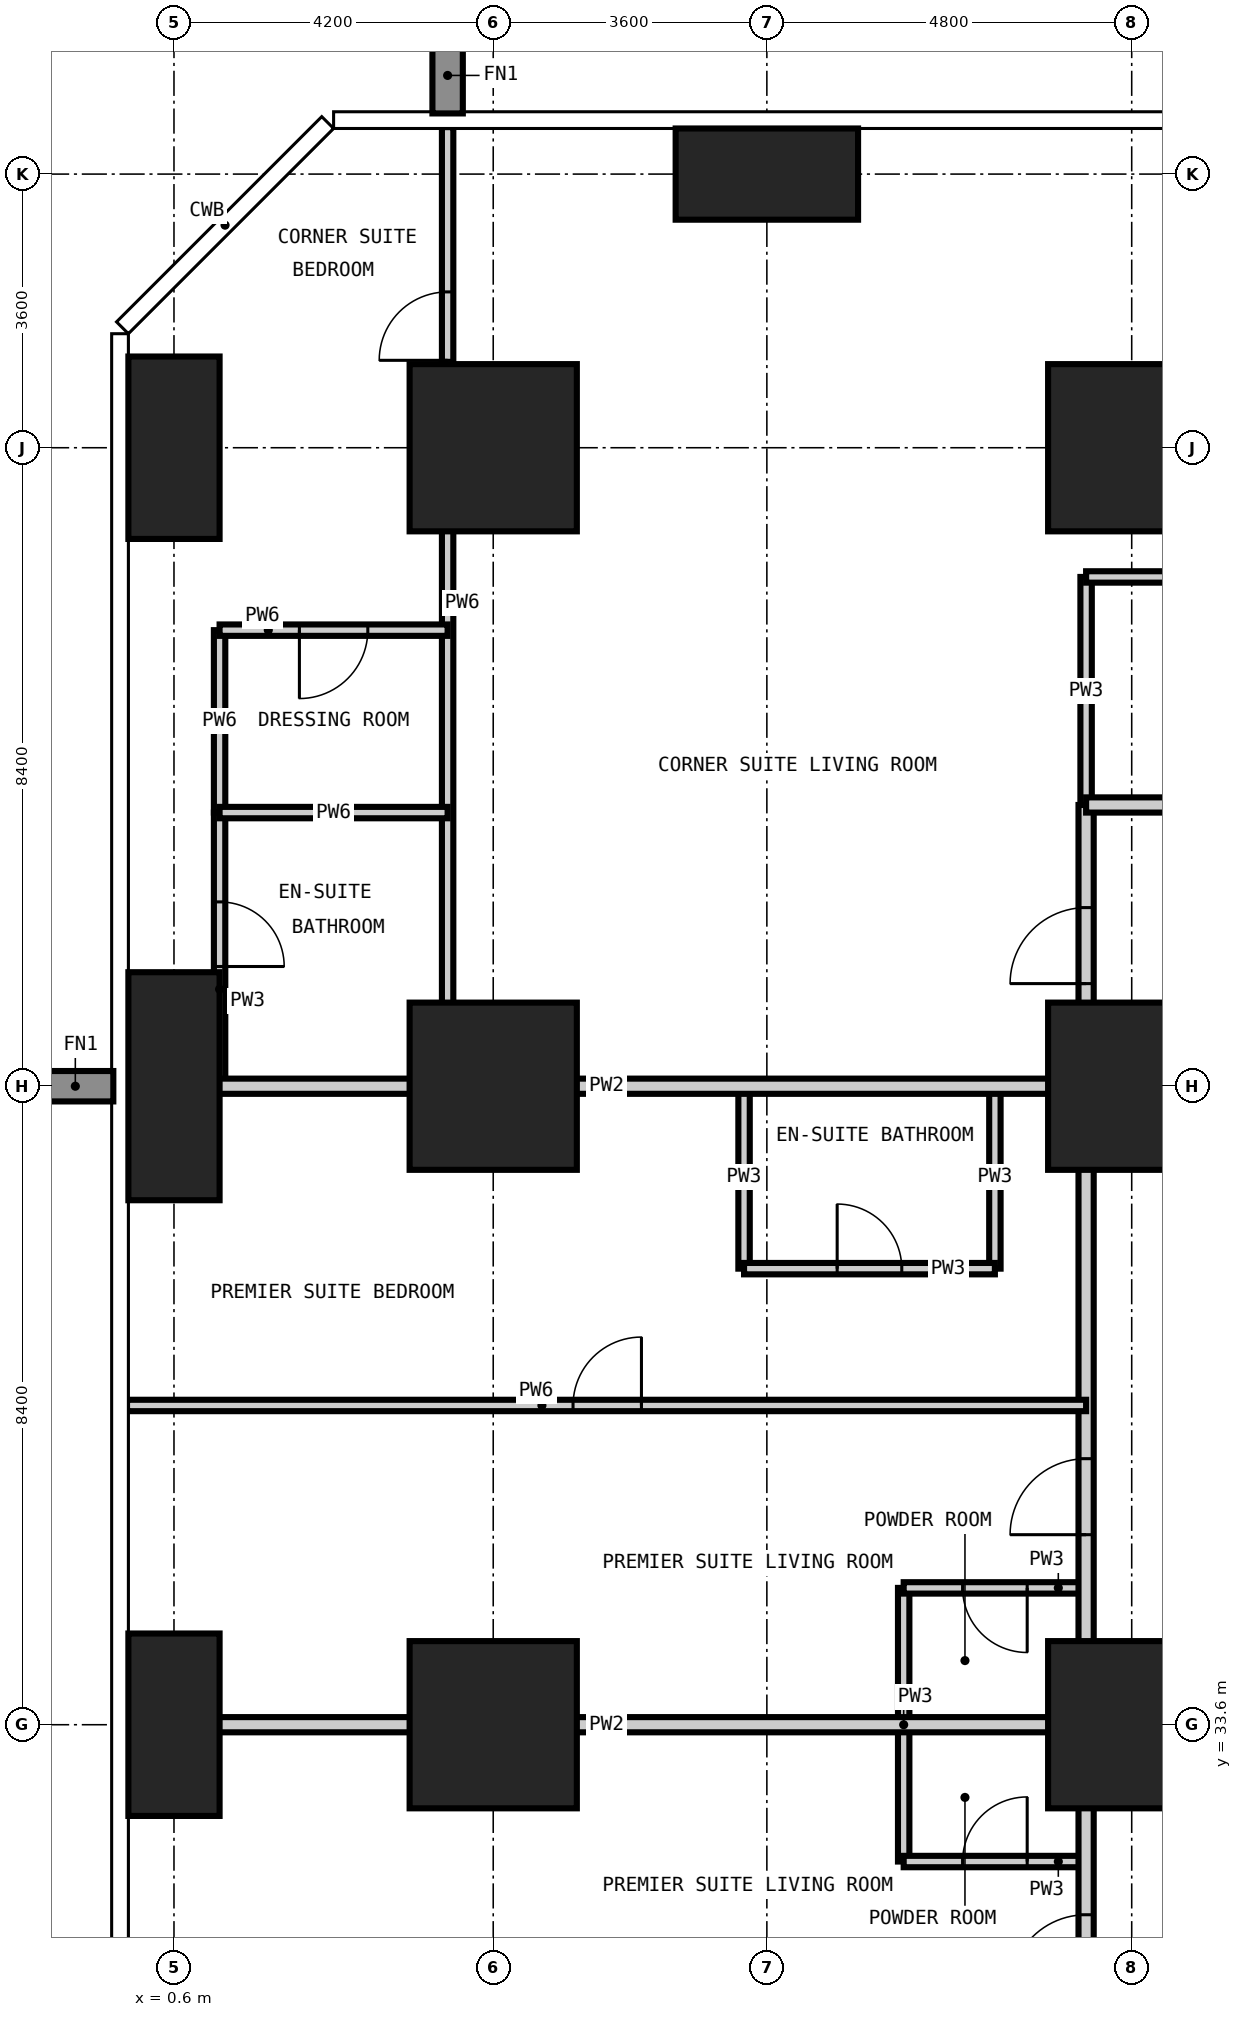
"""IFC4 building model, lengths in metres.
Left out: names, types, materials, properties, quantities, classifications, styles, units other than length and angle.
Written with IfcOpenShell. Run it as: python <this file> out.ifc"""

import sys

from ifc_helpers import new_model, si_unit, direction, frame, frame_2d, origin, origin_2d, place, context, subcontext, project, spatial, rectangle, extrude, element, fill, save


model = new_model("IFC4")
c1 = context("Model", 3, precision=1e-05, world=origin(), true_north=direction((0.0, 1.0)))
c2 = subcontext(c1, "Body", "Model", "MODEL_VIEW")
j1 = project(units=[si_unit("LENGTHUNIT", "METRE"), si_unit("PLANEANGLEUNIT", "RADIAN")], contexts=[c1])
p1 = place(None, origin())
s1 = spatial("IfcSite", under=j1, at=p1, CompositionType="ELEMENT")
p2 = place(p1, origin())
s2 = spatial("IfcBuilding", under=s1, at=p2, CompositionType="ELEMENT")
p3 = place(p2, frame((0.0, 0.0, 97.2)))
s3 = spatial("IfcBuildingStorey", under=s2, at=p3, CompositionType="ELEMENT", Elevation=97.2)
p4 = place(p3, frame((0.6, 33.6, -0.35), z_axis=(0.0, 0.0, 1.0), x_axis=(1.0, 0.0, 0.0)))
e1 = element("IfcColumn", 1, at=p4, inside=s3, PredefinedType="COLUMN", context=c2, shape_type="SweptSolid", body=[
    extrude(rectangle(XDim=1.2, YDim=2.4, at=origin_2d()), origin(), (0.0, 0.0, 1.0), 3.6),
])
p5 = place(p3, frame((0.6, 42.0, -0.35), z_axis=(0.0, 0.0, 1.0), x_axis=(1.0, 0.0, 0.0)))
e2 = element("IfcColumn", 2, at=p5, inside=s3, PredefinedType="COLUMN", context=c2, shape_type="SweptSolid", body=[
    extrude(rectangle(XDim=1.2, YDim=3.0, at=origin_2d()), origin(), (0.0, 0.0, 1.0), 3.6),
])
p6 = place(p3, frame((0.6, 50.4, -0.35), z_axis=(0.0, 0.0, 1.0), x_axis=(1.0, 0.0, 0.0)))
e3 = element("IfcColumn", 3, at=p6, inside=s3, PredefinedType="COLUMN", context=c2, shape_type="SweptSolid", body=[
    extrude(rectangle(XDim=1.2, YDim=2.4, at=origin_2d()), origin(), (0.0, 0.0, 1.0), 3.6),
])
for number, where, z_axis, x_axis in (
    (4, (4.8, 33.6, -0.35), (0.0, 0.0, 1.0), (1.0, 0.0, 0.0)),
    (5, (4.8, 42.0, -0.35), (0.0, 0.0, 1.0), (1.0, 0.0, 0.0)),
    (6, (4.8, 50.4, -0.35), (0.0, 0.0, 1.0), (1.0, 0.0, 0.0)),
):
    element("IfcColumn", number, at=place(p3, frame(where, z_axis=z_axis, x_axis=x_axis)), inside=s3, PredefinedType="COLUMN", context=c2, shape_type="SweptSolid", body=[
        extrude(rectangle(XDim=2.2, YDim=2.2, at=origin_2d()), origin(), (0.0, 0.0, 1.0), 3.6),
    ])
p7 = place(p3, frame((8.4, 54.0, -0.35), z_axis=(0.0, 0.0, 1.0), x_axis=(1.0, 0.0, 0.0)))
e7 = element("IfcColumn", 7, at=p7, inside=s3, PredefinedType="COLUMN", context=c2, shape_type="SweptSolid", body=[
    extrude(rectangle(XDim=2.4, YDim=1.2, at=origin_2d()), origin(), (0.0, 0.0, 1.0), 3.6),
])
for number, where, z_axis, x_axis in (
    (8, (13.2, 33.6, -0.35), (0.0, 0.0, 1.0), (1.0, 0.0, 0.0)),
    (9, (13.2, 42.0, -0.35), (0.0, 0.0, 1.0), (1.0, 0.0, 0.0)),
    (10, (13.2, 50.4, -0.35), (0.0, 0.0, 1.0), (1.0, 0.0, 0.0)),
):
    element("IfcColumn", number, at=place(p3, frame(where, z_axis=z_axis, x_axis=x_axis)), inside=s3, PredefinedType="COLUMN", context=c2, shape_type="SweptSolid", body=[
        extrude(rectangle(XDim=2.2, YDim=2.2, at=origin_2d()), origin(), (0.0, 0.0, 1.0), 3.6),
    ])
p8 = place(p3, frame((1.2, 42.0, 0.0), z_axis=(0.0, 0.0, 1.0), x_axis=(0.0, 1.0, 0.0)))
e11 = element("IfcWall", 11, at=p8, inside=s3, PredefinedType="PARTITIONING", context=c2, shape_type="SweptSolid", body=[
    extrude(rectangle(XDim=3.6, YDim=0.15, at=frame_2d((1.8, 0.0))), origin(), (0.0, 0.0, 1.0), 3.25),
])
p9 = place(p8, frame((1.575, 0.0, 0.0)))
e12 = element("IfcOpeningElement", 12, at=p9, cuts=e11, PredefinedType="OPENING", context=c2, shape_type="SweptSolid", body=[
    extrude(rectangle(XDim=0.85, YDim=2.1, at=frame_2d((0.425, 1.05))), frame((0.0, 0.085, 0.0), z_axis=(0.0, -1.0, 0.0), x_axis=(1.0, 0.0, 0.0)), (0.0, 0.0, 1.0), 0.17),
])
p10 = place(p3, frame((8.1, 39.6, 0.0), z_axis=(0.0, 0.0, 1.0), x_axis=(0.0, 1.0, 0.0)))
e13 = element("IfcWall", 13, at=p10, inside=s3, PredefinedType="PARTITIONING", context=c2, shape_type="SweptSolid", body=[
    extrude(rectangle(XDim=2.4, YDim=0.15, at=frame_2d((1.2, 0.0))), origin(), (0.0, 0.0, 1.0), 3.25),
])
p11 = place(p3, frame((10.2, 31.8, 0.0), z_axis=(0.0, 0.0, 1.0), x_axis=(0.0, 1.0, 0.0)))
e14 = element("IfcWall", 14, at=p11, inside=s3, PredefinedType="PARTITIONING", context=c2, shape_type="SweptSolid", body=[
    extrude(rectangle(XDim=3.6, YDim=0.15, at=frame_2d((1.8, 0.0))), origin(), (0.0, 0.0, 1.0), 3.25),
])
p12 = place(p3, frame((11.4, 39.6, 0.0), z_axis=(0.0, 0.0, 1.0), x_axis=(0.0, 1.0, 0.0)))
e15 = element("IfcWall", 15, at=p12, inside=s3, PredefinedType="PARTITIONING", context=c2, shape_type="SweptSolid", body=[
    extrude(rectangle(XDim=2.4, YDim=0.15, at=frame_2d((1.2, 0.0))), origin(), (0.0, 0.0, 1.0), 3.25),
])
p13 = place(p3, frame((12.6, 45.7, 0.0), z_axis=(0.0, 0.0, 1.0), x_axis=(0.0, 1.0, 0.0)))
e16 = element("IfcWall", 16, at=p13, inside=s3, PredefinedType="PARTITIONING", context=c2, shape_type="SweptSolid", body=[
    extrude(rectangle(XDim=3.0, YDim=0.15, at=frame_2d((1.5, 0.0))), origin(), (0.0, 0.0, 1.0), 3.25),
])
p14 = place(p3, frame((10.2, 31.8, 0.0), z_axis=(0.0, 0.0, 1.0), x_axis=(1.0, 0.0, 0.0)))
e17 = element("IfcWall", 17, at=p14, inside=s3, PredefinedType="PARTITIONING", context=c2, shape_type="SweptSolid", body=[
    extrude(rectangle(XDim=2.4, YDim=0.15, at=frame_2d((1.2, 0.0))), origin(), (0.0, 0.0, 1.0), 3.25),
])
p15 = place(p14, frame((0.775, 0.0, 0.0)))
e18 = element("IfcOpeningElement", 18, at=p15, cuts=e17, PredefinedType="OPENING", context=c2, shape_type="SweptSolid", body=[
    extrude(rectangle(XDim=0.85, YDim=2.1, at=frame_2d((0.425, 1.05))), frame((0.0, 0.085, 0.0), z_axis=(0.0, -1.0, 0.0), x_axis=(1.0, 0.0, 0.0)), (0.0, 0.0, 1.0), 0.17),
])
p16 = place(p3, frame((10.2, 35.4, 0.0), z_axis=(0.0, 0.0, 1.0), x_axis=(1.0, 0.0, 0.0)))
e19 = element("IfcWall", 19, at=p16, inside=s3, PredefinedType="PARTITIONING", context=c2, shape_type="SweptSolid", body=[
    extrude(rectangle(XDim=2.4, YDim=0.15, at=frame_2d((1.2, 0.0))), origin(), (0.0, 0.0, 1.0), 3.25),
])
p17 = place(p16, frame((0.775, 0.0, 0.0)))
e20 = element("IfcOpeningElement", 20, at=p17, cuts=e19, PredefinedType="OPENING", context=c2, shape_type="SweptSolid", body=[
    extrude(rectangle(XDim=0.85, YDim=2.1, at=frame_2d((0.425, 1.05))), frame((0.0, 0.085, 0.0), z_axis=(0.0, -1.0, 0.0), x_axis=(1.0, 0.0, 0.0)), (0.0, 0.0, 1.0), 0.17),
])
p18 = place(p3, frame((8.1, 39.6, 0.0), z_axis=(0.0, 0.0, 1.0), x_axis=(1.0, 0.0, 0.0)))
e21 = element("IfcWall", 21, at=p18, inside=s3, PredefinedType="PARTITIONING", context=c2, shape_type="SweptSolid", body=[
    extrude(rectangle(XDim=3.3, YDim=0.15, at=frame_2d((1.65, 0.0))), origin(), (0.0, 0.0, 1.0), 3.25),
])
p19 = place(p18, frame((1.225, 0.0, 0.0)))
e22 = element("IfcOpeningElement", 22, at=p19, cuts=e21, PredefinedType="OPENING", context=c2, shape_type="SweptSolid", body=[
    extrude(rectangle(XDim=0.85, YDim=2.1, at=frame_2d((0.425, 1.05))), frame((0.0, 0.085, 0.0), z_axis=(0.0, -1.0, 0.0), x_axis=(1.0, 0.0, 0.0)), (0.0, 0.0, 1.0), 0.17),
])
p20 = place(p3, frame((12.6, 48.7, 0.0), z_axis=(0.0, 0.0, 1.0), x_axis=(1.0, 0.0, 0.0)))
e23 = element("IfcWall", 23, at=p20, inside=s3, PredefinedType="PARTITIONING", context=c2, shape_type="SweptSolid", body=[
    extrude(rectangle(XDim=4.2, YDim=0.15, at=frame_2d((2.1, 0.0))), origin(), (0.0, 0.0, 1.0), 3.25),
])
p21 = place(p20, frame((1.675, 0.0, 0.0)))
e24 = element("IfcOpeningElement", 24, at=p21, cuts=e23, PredefinedType="OPENING", context=c2, shape_type="SweptSolid", body=[
    extrude(rectangle(XDim=0.85, YDim=2.1, at=frame_2d((0.425, 1.05))), frame((0.0, 0.085, 0.0), z_axis=(0.0, -1.0, 0.0), x_axis=(1.0, 0.0, 0.0)), (0.0, 0.0, 1.0), 0.17),
])
p22 = place(p3, frame((12.6, 13.7, 0.0), z_axis=(0.0, 0.0, 1.0), x_axis=(0.0, 1.0, 0.0)))
e25 = element("IfcWall", 25, at=p22, inside=s3, PredefinedType="PARTITIONING", context=c2, shape_type="SweptSolid", body=[
    extrude(rectangle(XDim=32.0, YDim=0.2, at=frame_2d((16.0, 0.0))), origin(), (0.0, 0.0, 1.0), 3.25),
])
p23 = place(p22, frame((5.6, 0.0, 0.0)))
e26 = element("IfcOpeningElement", 26, at=p23, cuts=e25, PredefinedType="OPENING", context=c2, shape_type="SweptSolid", body=[
    extrude(rectangle(XDim=1.0, YDim=2.2, at=frame_2d((0.5, 1.1))), frame((0.0, 0.11, 0.0), z_axis=(0.0, -1.0, 0.0), x_axis=(1.0, 0.0, 0.0)), (0.0, 0.0, 1.0), 0.22),
])
p24 = place(p22, frame((16.4, 0.0, 0.0)))
e27 = element("IfcOpeningElement", 27, at=p24, cuts=e25, PredefinedType="OPENING", context=c2, shape_type="SweptSolid", body=[
    extrude(rectangle(XDim=1.0, YDim=2.2, at=frame_2d((0.5, 1.1))), frame((0.0, 0.11, 0.0), z_axis=(0.0, -1.0, 0.0), x_axis=(1.0, 0.0, 0.0)), (0.0, 0.0, 1.0), 0.22),
])
p25 = place(p22, frame((22.4, 0.0, 0.0)))
e28 = element("IfcOpeningElement", 28, at=p25, cuts=e25, PredefinedType="OPENING", context=c2, shape_type="SweptSolid", body=[
    extrude(rectangle(XDim=1.0, YDim=2.2, at=frame_2d((0.5, 1.1))), frame((0.0, 0.11, 0.0), z_axis=(0.0, -1.0, 0.0), x_axis=(1.0, 0.0, 0.0)), (0.0, 0.0, 1.0), 0.22),
])
p26 = place(p22, frame((0.95, 0.0, 0.0)))
e29 = element("IfcOpeningElement", 29, at=p26, cuts=e25, PredefinedType="OPENING", context=c2, shape_type="SweptSolid", body=[
    extrude(rectangle(XDim=1.0, YDim=2.2, at=frame_2d((0.5, 1.1))), frame((0.0, 0.11, 0.0), z_axis=(0.0, -1.0, 0.0), x_axis=(1.0, 0.0, 0.0)), (0.0, 0.0, 1.0), 0.22),
])
p27 = place(p22, frame((29.65, 0.0, 0.0)))
e30 = element("IfcOpeningElement", 30, at=p27, cuts=e25, PredefinedType="OPENING", context=c2, shape_type="SweptSolid", body=[
    extrude(rectangle(XDim=1.0, YDim=2.2, at=frame_2d((0.5, 1.1))), frame((0.0, 0.11, 0.0), z_axis=(0.0, -1.0, 0.0), x_axis=(1.0, 0.0, 0.0)), (0.0, 0.0, 1.0), 0.22),
])
p28 = place(p3, frame((12.6, 45.7, 0.0), z_axis=(0.0, 0.0, 1.0), x_axis=(1.0, 0.0, 0.0)))
e31 = element("IfcWall", 31, at=p28, inside=s3, PredefinedType="PARTITIONING", context=c2, shape_type="SweptSolid", body=[
    extrude(rectangle(XDim=31.9, YDim=0.2, at=frame_2d((15.95, 0.0))), origin(), (0.0, 0.0, 1.0), 3.25),
])
p29 = place(p28, frame((5.8, 0.0, 0.0)))
e32 = element("IfcOpeningElement", 32, at=p29, cuts=e31, PredefinedType="OPENING", context=c2, shape_type="SweptSolid", body=[
    extrude(rectangle(XDim=1.0, YDim=2.2, at=frame_2d((0.5, 1.1))), frame((0.0, 0.11, 0.0), z_axis=(0.0, -1.0, 0.0), x_axis=(1.0, 0.0, 0.0)), (0.0, 0.0, 1.0), 0.22),
])
p30 = place(p28, frame((12.1, 0.0, 0.0)))
e33 = element("IfcOpeningElement", 33, at=p30, cuts=e31, PredefinedType="OPENING", context=c2, shape_type="SweptSolid", body=[
    extrude(rectangle(XDim=1.0, YDim=2.2, at=frame_2d((0.5, 1.1))), frame((0.0, 0.11, 0.0), z_axis=(0.0, -1.0, 0.0), x_axis=(1.0, 0.0, 0.0)), (0.0, 0.0, 1.0), 0.22),
])
p31 = place(p28, frame((20.5, 0.0, 0.0)))
e34 = element("IfcOpeningElement", 34, at=p31, cuts=e31, PredefinedType="OPENING", context=c2, shape_type="SweptSolid", body=[
    extrude(rectangle(XDim=1.0, YDim=2.2, at=frame_2d((0.5, 1.1))), frame((0.0, 0.11, 0.0), z_axis=(0.0, -1.0, 0.0), x_axis=(1.0, 0.0, 0.0)), (0.0, 0.0, 1.0), 0.22),
])
p32 = place(p28, frame((26.8, 0.0, 0.0)))
e35 = element("IfcOpeningElement", 35, at=p32, cuts=e31, PredefinedType="OPENING", context=c2, shape_type="SweptSolid", body=[
    extrude(rectangle(XDim=1.0, YDim=2.2, at=frame_2d((0.5, 1.1))), frame((0.0, 0.11, 0.0), z_axis=(0.0, -1.0, 0.0), x_axis=(1.0, 0.0, 0.0)), (0.0, 0.0, 1.0), 0.22),
])
for number, where, z_axis, x_axis in (
    (36, (-0.018, 33.6, 0.0), (0.0, 0.0, 1.0), (1.0, 0.0, 0.0)),
    (37, (-0.018, 42.0, 0.0), (0.0, 0.0, 1.0), (1.0, 0.0, 0.0)),
):
    element("IfcWall", number, at=place(p3, frame(where, z_axis=z_axis, x_axis=x_axis)), inside=s3, PredefinedType="PARTITIONING", context=c2, shape_type="SweptSolid", body=[
        extrude(rectangle(XDim=12.618, YDim=0.2, at=frame_2d((6.309, 0.0))), origin(), (0.0, 0.0, 1.0), 3.25),
    ])
p33 = place(p3, frame((1.2, 45.6, 0.0), z_axis=(0.0, 0.0, 1.0), x_axis=(0.0, 1.0, 0.0)))
e38 = element("IfcWall", 38, at=p33, inside=s3, PredefinedType="PARTITIONING", context=c2, shape_type="SweptSolid", body=[
    extrude(rectangle(XDim=2.4, YDim=0.15, at=frame_2d((1.2, 0.0))), origin(), (0.0, 0.0, 1.0), 3.25),
])
p34 = place(p3, frame((4.2, 42.0, 0.0), z_axis=(0.0, 0.0, 1.0), x_axis=(0.0, 1.0, 0.0)))
e39 = element("IfcWall", 39, at=p34, inside=s3, PredefinedType="PARTITIONING", context=c2, shape_type="SweptSolid", body=[
    extrude(rectangle(XDim=12.618, YDim=0.15, at=frame_2d((6.309, 0.0))), origin(), (0.0, 0.0, 1.0), 3.25),
])
p35 = place(p34, frame((9.55, 0.0, 0.0)))
e40 = element("IfcOpeningElement", 40, at=p35, cuts=e39, PredefinedType="OPENING", context=c2, shape_type="SweptSolid", body=[
    extrude(rectangle(XDim=0.9, YDim=2.1, at=frame_2d((0.45, 1.05))), frame((0.0, 0.085, 0.0), z_axis=(0.0, -1.0, 0.0), x_axis=(1.0, 0.0, 0.0)), (0.0, 0.0, 1.0), 0.17),
])
p36 = place(p3, frame((-0.018, 37.8, 0.0), z_axis=(0.0, 0.0, 1.0), x_axis=(1.0, 0.0, 0.0)))
e41 = element("IfcWall", 41, at=p36, inside=s3, PredefinedType="PARTITIONING", context=c2, shape_type="SweptSolid", body=[
    extrude(rectangle(XDim=12.618, YDim=0.15, at=frame_2d((6.309, 0.0))), origin(), (0.0, 0.0, 1.0), 3.25),
])
p37 = place(p36, frame((5.868, 0.0, 0.0)))
e42 = element("IfcOpeningElement", 42, at=p37, cuts=e41, PredefinedType="OPENING", context=c2, shape_type="SweptSolid", body=[
    extrude(rectangle(XDim=0.9, YDim=2.1, at=frame_2d((0.45, 1.05))), frame((0.0, 0.085, 0.0), z_axis=(0.0, -1.0, 0.0), x_axis=(1.0, 0.0, 0.0)), (0.0, 0.0, 1.0), 0.17),
])
p38 = place(p3, frame((1.2, 45.6, 0.0), z_axis=(0.0, 0.0, 1.0), x_axis=(1.0, 0.0, 0.0)))
e43 = element("IfcWall", 43, at=p38, inside=s3, PredefinedType="PARTITIONING", context=c2, shape_type="SweptSolid", body=[
    extrude(rectangle(XDim=3.0, YDim=0.15, at=frame_2d((1.5, 0.0))), origin(), (0.0, 0.0, 1.0), 3.25),
])
p39 = place(p3, frame((1.2, 48.0, 0.0), z_axis=(0.0, 0.0, 1.0), x_axis=(1.0, 0.0, 0.0)))
e44 = element("IfcWall", 44, at=p39, inside=s3, PredefinedType="PARTITIONING", context=c2, shape_type="SweptSolid", body=[
    extrude(rectangle(XDim=3.0, YDim=0.15, at=frame_2d((1.5, 0.0))), origin(), (0.0, 0.0, 1.0), 3.25),
])
p40 = place(p39, frame((1.05, 0.0, 0.0)))
e45 = element("IfcOpeningElement", 45, at=p40, cuts=e44, PredefinedType="OPENING", context=c2, shape_type="SweptSolid", body=[
    extrude(rectangle(XDim=0.9, YDim=2.1, at=frame_2d((0.45, 1.05))), frame((0.0, 0.085, 0.0), z_axis=(0.0, -1.0, 0.0), x_axis=(1.0, 0.0, 0.0)), (0.0, 0.0, 1.0), 0.17),
])
p41 = place(p24, origin())
e46 = element("IfcDoor", 46, at=p41, inside=s3, OperationType="SINGLE_SWING_LEFT", PredefinedType="DOOR", context=c2, shape_type="SweptSolid", body=[
    extrude(rectangle(XDim=1.0, YDim=2.2, at=frame_2d((0.5, 1.1))), frame((0.0, 0.025, 0.0), z_axis=(0.0, -1.0, 0.0), x_axis=(1.0, 0.0, 0.0)), (0.0, 0.0, 1.0), 0.05),
])
fill(e27, e46)
p42 = place(p15, origin())
e47 = element("IfcDoor", 47, at=p42, inside=s3, OperationType="SINGLE_SWING_RIGHT", PredefinedType="DOOR", context=c2, shape_type="SweptSolid", body=[
    extrude(rectangle(XDim=0.85, YDim=2.1, at=frame_2d((0.425, 1.05))), frame((0.0, 0.025, 0.0), z_axis=(0.0, -1.0, 0.0), x_axis=(1.0, 0.0, 0.0)), (0.0, 0.0, 1.0), 0.05),
])
fill(e18, e47)
p43 = place(p25, origin())
e48 = element("IfcDoor", 48, at=p43, inside=s3, OperationType="SINGLE_SWING_LEFT", PredefinedType="DOOR", context=c2, shape_type="SweptSolid", body=[
    extrude(rectangle(XDim=1.0, YDim=2.2, at=frame_2d((0.5, 1.1))), frame((0.0, 0.025, 0.0), z_axis=(0.0, -1.0, 0.0), x_axis=(1.0, 0.0, 0.0)), (0.0, 0.0, 1.0), 0.05),
])
fill(e28, e48)
p44 = place(p17, frame((0.85, 0.0, 0.0), z_axis=(0.0, 0.0, 1.0), x_axis=(-1.0, 0.0, 0.0)))
e49 = element("IfcDoor", 49, at=p44, inside=s3, OperationType="SINGLE_SWING_LEFT", PredefinedType="DOOR", context=c2, shape_type="SweptSolid", body=[
    extrude(rectangle(XDim=0.85, YDim=2.1, at=frame_2d((0.425, 1.05))), frame((0.0, 0.025, 0.0), z_axis=(0.0, -1.0, 0.0), x_axis=(1.0, 0.0, 0.0)), (0.0, 0.0, 1.0), 0.05),
])
fill(e20, e49)
p45 = place(p37, origin())
e50 = element("IfcDoor", 50, at=p45, inside=s3, OperationType="SINGLE_SWING_RIGHT", PredefinedType="DOOR", context=c2, shape_type="SweptSolid", body=[
    extrude(rectangle(XDim=0.9, YDim=2.1, at=frame_2d((0.45, 1.05))), frame((0.0, 0.025, 0.0), z_axis=(0.0, -1.0, 0.0), x_axis=(1.0, 0.0, 0.0)), (0.0, 0.0, 1.0), 0.05),
])
fill(e42, e50)
p46 = place(p19, origin())
e51 = element("IfcDoor", 51, at=p46, inside=s3, OperationType="SINGLE_SWING_LEFT", PredefinedType="DOOR", context=c2, shape_type="SweptSolid", body=[
    extrude(rectangle(XDim=0.85, YDim=2.1, at=frame_2d((0.425, 1.05))), frame((0.0, 0.025, 0.0), z_axis=(0.0, -1.0, 0.0), x_axis=(1.0, 0.0, 0.0)), (0.0, 0.0, 1.0), 0.05),
])
fill(e22, e51)
p47 = place(p27, origin())
e52 = element("IfcDoor", 52, at=p47, inside=s3, OperationType="SINGLE_SWING_LEFT", PredefinedType="DOOR", context=c2, shape_type="SweptSolid", body=[
    extrude(rectangle(XDim=1.0, YDim=2.2, at=frame_2d((0.5, 1.1))), frame((0.0, 0.025, 0.0), z_axis=(0.0, -1.0, 0.0), x_axis=(1.0, 0.0, 0.0)), (0.0, 0.0, 1.0), 0.05),
])
fill(e30, e52)
p48 = place(p35, origin())
e53 = element("IfcDoor", 53, at=p48, inside=s3, OperationType="SINGLE_SWING_LEFT", PredefinedType="DOOR", context=c2, shape_type="SweptSolid", body=[
    extrude(rectangle(XDim=0.9, YDim=2.1, at=frame_2d((0.45, 1.05))), frame((0.0, 0.025, 0.0), z_axis=(0.0, -1.0, 0.0), x_axis=(1.0, 0.0, 0.0)), (0.0, 0.0, 1.0), 0.05),
])
fill(e40, e53)
p49 = place(p9, frame((0.85, 0.0, 0.0), z_axis=(0.0, 0.0, 1.0), x_axis=(-1.0, 0.0, 0.0)))
e54 = element("IfcDoor", 54, at=p49, inside=s3, OperationType="SINGLE_SWING_RIGHT", PredefinedType="DOOR", context=c2, shape_type="SweptSolid", body=[
    extrude(rectangle(XDim=0.85, YDim=2.1, at=frame_2d((0.425, 1.05))), frame((0.0, 0.025, 0.0), z_axis=(0.0, -1.0, 0.0), x_axis=(1.0, 0.0, 0.0)), (0.0, 0.0, 1.0), 0.05),
])
fill(e12, e54)
p50 = place(p40, frame((0.9, 0.0, 0.0), z_axis=(0.0, 0.0, 1.0), x_axis=(-1.0, 0.0, 0.0)))
e55 = element("IfcDoor", 55, at=p50, inside=s3, OperationType="SINGLE_SWING_RIGHT", PredefinedType="DOOR", context=c2, shape_type="SweptSolid", body=[
    extrude(rectangle(XDim=0.9, YDim=2.1, at=frame_2d((0.45, 1.05))), frame((0.0, 0.025, 0.0), z_axis=(0.0, -1.0, 0.0), x_axis=(1.0, 0.0, 0.0)), (0.0, 0.0, 1.0), 0.05),
])
fill(e45, e55)
save(model, sys.argv[1])
